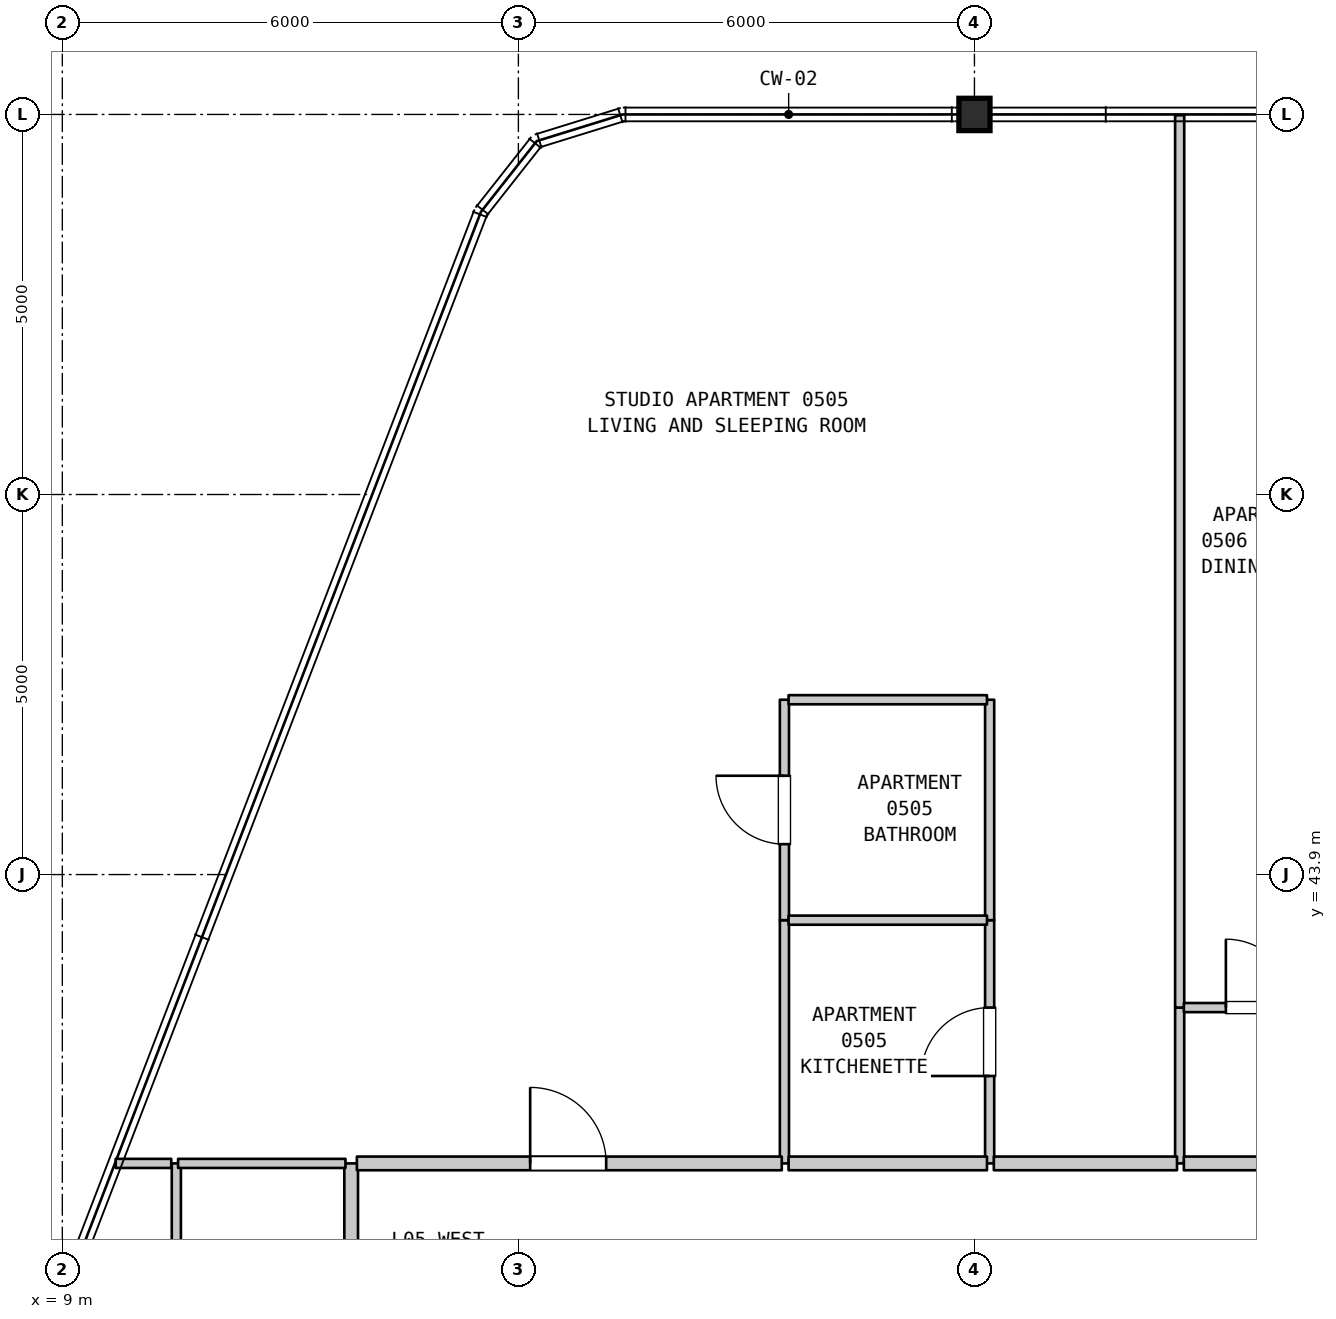
"""IFC4 building model, lengths in metres.
Left out: names, types, materials, properties, quantities, classifications, styles, units other than length and angle.
Written with IfcOpenShell. Run it as: python <this file> out.ifc"""

import sys

from ifc_helpers import new_model, si_unit, direction, frame, frame_2d, origin, origin_2d, place, context, subcontext, project, spatial, rectangle, i_section, extrude, element, fill, save


model = new_model("IFC4")
c1 = context("Model", 3, precision=1e-05, world=origin(), true_north=direction((0.0, 1.0)))
c2 = subcontext(c1, "Body", "Model", "MODEL_VIEW")
j1 = project(units=[si_unit("LENGTHUNIT", "METRE"), si_unit("PLANEANGLEUNIT", "RADIAN")], contexts=[c1])
p1 = place(None, origin())
s1 = spatial("IfcSite", under=j1, at=p1, CompositionType="ELEMENT")
p2 = place(p1, origin())
s2 = spatial("IfcBuilding", under=s1, at=p2, CompositionType="ELEMENT")
p3 = place(p2, frame((0.0, 0.0, 27.7)))
s3 = spatial("IfcBuildingStorey", under=s2, at=p3, CompositionType="ELEMENT", Elevation=27.7)
p4 = place(p3, frame((21.0, 53.9, 0.0), z_axis=(0.0, 0.0, 1.0), x_axis=(1.0, 0.0, 0.0)))
e1 = element("IfcColumn", 1, at=p4, inside=s3, PredefinedType="COLUMN", context=c2, shape_type="SweptSolid", body=[
    extrude(i_section(OverallWidth=0.409, OverallDepth=0.425, WebThickness=0.032, FlangeThickness=0.052, FilletRadius=0.015, at=origin_2d()), origin(), (0.0, 0.0, 1.0), 3.7),
])
p5 = place(p3, frame((10.5, 31.45, 0.0), z_axis=(0.0, 0.0, 1.0), x_axis=(0.0, 1.0, 0.0)))
e2 = element("IfcWall", 2, at=p5, inside=s3, PredefinedType="PARTITIONING", context=c2, shape_type="SweptSolid", body=[
    extrude(rectangle(XDim=8.65, YDim=0.12, at=frame_2d((4.325, 0.0))), origin(), (0.0, 0.0, 1.0), 3.385),
])
p6 = place(p3, frame((12.8, 31.45, 0.0), z_axis=(0.0, 0.0, 1.0), x_axis=(0.0, 1.0, 0.0)))
e3 = element("IfcWall", 3, at=p6, inside=s3, PredefinedType="STANDARD", context=c2, shape_type="SweptSolid", body=[
    extrude(rectangle(XDim=8.65, YDim=0.18, at=frame_2d((4.325, 0.0))), origin(), (0.0, 0.0, 1.0), 3.385),
])
p7 = place(p3, frame((18.5, 40.1, 0.0), z_axis=(0.0, 0.0, 1.0), x_axis=(0.0, 1.0, 0.0)))
e4 = element("IfcWall", 4, at=p7, inside=s3, PredefinedType="PARTITIONING", context=c2, shape_type="SweptSolid", body=[
    extrude(rectangle(XDim=3.2, YDim=0.12, at=frame_2d((1.6, 0.0))), origin(), (0.0, 0.0, 1.0), 3.385),
])
p8 = place(p3, frame((18.5, 43.3, 0.0), z_axis=(0.0, 0.0, 1.0), x_axis=(0.0, 1.0, 0.0)))
e5 = element("IfcWall", 5, at=p8, inside=s3, PredefinedType="PARTITIONING", context=c2, shape_type="SweptSolid", body=[
    extrude(rectangle(XDim=2.9, YDim=0.12, at=frame_2d((1.45, 0.0))), origin(), (0.0, 0.0, 1.0), 3.385),
])
p9 = place(p8, frame((1.0, 0.0, 0.0)))
e6 = element("IfcOpeningElement", 6, at=p9, cuts=e5, PredefinedType="OPENING", context=c2, shape_type="SweptSolid", body=[
    extrude(rectangle(XDim=0.9, YDim=2.1, at=frame_2d((0.45, 1.05))), frame((0.0, 0.07, 0.0), z_axis=(0.0, -1.0, 0.0), x_axis=(1.0, 0.0, 0.0)), (0.0, 0.0, 1.0), 0.14),
])
p10 = place(p3, frame((21.2, 40.1, 0.0), z_axis=(0.0, 0.0, 1.0), x_axis=(0.0, 1.0, 0.0)))
e7 = element("IfcWall", 7, at=p10, inside=s3, PredefinedType="PARTITIONING", context=c2, shape_type="SweptSolid", body=[
    extrude(rectangle(XDim=3.2, YDim=0.12, at=frame_2d((1.6, 0.0))), origin(), (0.0, 0.0, 1.0), 3.385),
])
p11 = place(p10, frame((1.15, 0.0, 0.0)))
e8 = element("IfcOpeningElement", 8, at=p11, cuts=e7, PredefinedType="OPENING", context=c2, shape_type="SweptSolid", body=[
    extrude(rectangle(XDim=0.9, YDim=2.15, at=frame_2d((0.45, 1.075))), frame((0.0, 0.07, 0.0), z_axis=(0.0, -1.0, 0.0), x_axis=(1.0, 0.0, 0.0)), (0.0, 0.0, 1.0), 0.14),
])
p12 = place(p3, frame((21.2, 43.3, 0.0), z_axis=(0.0, 0.0, 1.0), x_axis=(0.0, 1.0, 0.0)))
e9 = element("IfcWall", 9, at=p12, inside=s3, PredefinedType="PARTITIONING", context=c2, shape_type="SweptSolid", body=[
    extrude(rectangle(XDim=2.9, YDim=0.12, at=frame_2d((1.45, 0.0))), origin(), (0.0, 0.0, 1.0), 3.385),
])
p13 = place(p3, frame((23.7, 40.1, 0.0), z_axis=(0.0, 0.0, 1.0), x_axis=(0.0, 1.0, 0.0)))
e10 = element("IfcWall", 10, at=p13, inside=s3, PredefinedType="PARTITIONING", context=c2, shape_type="SweptSolid", body=[
    extrude(rectangle(XDim=2.05, YDim=0.12, at=frame_2d((1.025, 0.0))), origin(), (0.0, 0.0, 1.0), 3.385),
])
p14 = place(p3, frame((23.7, 42.15, 0.0), z_axis=(0.0, 0.0, 1.0), x_axis=(0.0, 1.0, 0.0)))
e11 = element("IfcWall", 11, at=p14, inside=s3, PredefinedType="PARTITIONING", context=c2, shape_type="SweptSolid", body=[
    extrude(rectangle(XDim=11.74, YDim=0.12, at=frame_2d((5.87, 0.0))), origin(), (0.0, 0.0, 1.0), 3.385),
])
p15 = place(p3, frame((9.702, 40.1, 0.0), z_axis=(0.0, 0.0, 1.0), x_axis=(1.0, 0.0, 0.0)))
e12 = element("IfcWall", 12, at=p15, inside=s3, PredefinedType="PARTITIONING", context=c2, shape_type="SweptSolid", body=[
    extrude(rectangle(XDim=0.731, YDim=0.12, at=frame_2d((0.366, 0.0))), origin(), (0.0, 0.0, 1.0), 3.385),
])
p16 = place(p3, frame((10.523, 40.1, 0.0), z_axis=(0.0, 0.0, 1.0), x_axis=(1.0, 0.0, 0.0)))
e13 = element("IfcWall", 13, at=p16, inside=s3, PredefinedType="PARTITIONING", context=c2, shape_type="SweptSolid", body=[
    extrude(rectangle(XDim=2.202, YDim=0.12, at=frame_2d((1.101, 0.0))), origin(), (0.0, 0.0, 1.0), 3.385),
])
p17 = place(p3, frame((12.875, 40.1, 0.0), z_axis=(0.0, 0.0, 1.0), x_axis=(1.0, 0.0, 0.0)))
e14 = element("IfcWall", 14, at=p17, inside=s3, PredefinedType="STANDARD", context=c2, shape_type="SweptSolid", body=[
    extrude(rectangle(XDim=5.59, YDim=0.18, at=frame_2d((2.795, 0.0))), origin(), (0.0, 0.0, 1.0), 3.385),
])
p18 = place(p17, frame((2.28, 0.0, 0.0)))
e15 = element("IfcOpeningElement", 15, at=p18, cuts=e14, PredefinedType="OPENING", context=c2, shape_type="SweptSolid", body=[
    extrude(rectangle(XDim=1.0, YDim=2.15, at=frame_2d((0.5, 1.075))), frame((0.0, 0.1, 0.0), z_axis=(0.0, -1.0, 0.0), x_axis=(1.0, 0.0, 0.0)), (0.0, 0.0, 1.0), 0.2),
])
p19 = place(p3, frame((18.555, 40.1, 0.0), z_axis=(0.0, 0.0, 1.0), x_axis=(1.0, 0.0, 0.0)))
e16 = element("IfcWall", 16, at=p19, inside=s3, PredefinedType="STANDARD", context=c2, shape_type="SweptSolid", body=[
    extrude(rectangle(XDim=2.61, YDim=0.18, at=frame_2d((1.305, 0.0))), origin(), (0.0, 0.0, 1.0), 3.385),
])
p20 = place(p3, frame((21.255, 40.1, 0.0), z_axis=(0.0, 0.0, 1.0), x_axis=(1.0, 0.0, 0.0)))
e17 = element("IfcWall", 17, at=p20, inside=s3, PredefinedType="STANDARD", context=c2, shape_type="SweptSolid", body=[
    extrude(rectangle(XDim=2.41, YDim=0.18, at=frame_2d((1.205, 0.0))), origin(), (0.0, 0.0, 1.0), 3.385),
])
p21 = place(p3, frame((23.755, 40.1, 0.0), z_axis=(0.0, 0.0, 1.0), x_axis=(1.0, 0.0, 0.0)))
e18 = element("IfcWall", 18, at=p21, inside=s3, PredefinedType="STANDARD", context=c2, shape_type="SweptSolid", body=[
    extrude(rectangle(XDim=5.095, YDim=0.18, at=frame_2d((2.548, 0.0))), origin(), (0.0, 0.0, 1.0), 3.385),
])
p22 = place(p21, frame((2.08, 0.0, 0.0)))
e19 = element("IfcOpeningElement", 19, at=p22, cuts=e18, PredefinedType="OPENING", context=c2, shape_type="SweptSolid", body=[
    extrude(rectangle(XDim=1.0, YDim=2.15, at=frame_2d((0.5, 1.075))), frame((0.0, 0.1, 0.0), z_axis=(0.0, -1.0, 0.0), x_axis=(1.0, 0.0, 0.0)), (0.0, 0.0, 1.0), 0.2),
])
p23 = place(p3, frame((23.755, 42.15, 0.0), z_axis=(0.0, 0.0, 1.0), x_axis=(1.0, 0.0, 0.0)))
e20 = element("IfcWall", 20, at=p23, inside=s3, PredefinedType="PARTITIONING", context=c2, shape_type="SweptSolid", body=[
    extrude(rectangle(XDim=2.16, YDim=0.12, at=frame_2d((1.08, 0.0))), origin(), (0.0, 0.0, 1.0), 3.385),
])
p24 = place(p23, frame((0.553, 0.0, 0.0)))
e21 = element("IfcOpeningElement", 21, at=p24, cuts=e20, PredefinedType="OPENING", context=c2, shape_type="SweptSolid", body=[
    extrude(rectangle(XDim=0.9, YDim=2.15, at=frame_2d((0.45, 1.075))), frame((0.0, 0.07, 0.0), z_axis=(0.0, -1.0, 0.0), x_axis=(1.0, 0.0, 0.0)), (0.0, 0.0, 1.0), 0.14),
])
for number, where, z_axis, x_axis in (
    (22, (18.555, 43.3, 0.0), (0.0, 0.0, 1.0), (1.0, 0.0, 0.0)),
    (23, (18.555, 46.2, 0.0), (0.0, 0.0, 1.0), (1.0, 0.0, 0.0)),
):
    element("IfcWall", number, at=place(p3, frame(where, z_axis=z_axis, x_axis=x_axis)), inside=s3, PredefinedType="PARTITIONING", context=c2, shape_type="SweptSolid", body=[
        extrude(rectangle(XDim=2.61, YDim=0.12, at=frame_2d((1.305, 0.0))), origin(), (0.0, 0.0, 1.0), 3.385),
    ])
p25 = place(p9, origin())
e24 = element("IfcDoor", 24, at=p25, inside=s3, OperationType="SINGLE_SWING_RIGHT", PredefinedType="DOOR", context=c2, shape_type="SweptSolid", body=[
    extrude(rectangle(XDim=0.9, YDim=2.1, at=frame_2d((0.45, 1.05))), frame((0.0, 0.025, 0.0), z_axis=(0.0, -1.0, 0.0), x_axis=(1.0, 0.0, 0.0)), (0.0, 0.0, 1.0), 0.05),
])
fill(e6, e24)
p26 = place(p11, origin())
e25 = element("IfcDoor", 25, at=p26, inside=s3, OperationType="SINGLE_SWING_LEFT", PredefinedType="DOOR", context=c2, shape_type="SweptSolid", body=[
    extrude(rectangle(XDim=0.9, YDim=2.15, at=frame_2d((0.45, 1.075))), frame((0.0, 0.025, 0.0), z_axis=(0.0, -1.0, 0.0), x_axis=(1.0, 0.0, 0.0)), (0.0, 0.0, 1.0), 0.05),
])
fill(e8, e25)
p27 = place(p18, origin())
e26 = element("IfcDoor", 26, at=p27, inside=s3, OperationType="SINGLE_SWING_LEFT", PredefinedType="DOOR", context=c2, shape_type="SweptSolid", body=[
    extrude(rectangle(XDim=1.0, YDim=2.15, at=frame_2d((0.5, 1.075))), frame((0.0, 0.025, 0.0), z_axis=(0.0, -1.0, 0.0), x_axis=(1.0, 0.0, 0.0)), (0.0, 0.0, 1.0), 0.05),
])
fill(e15, e26)
p28 = place(p24, origin())
e27 = element("IfcDoor", 27, at=p28, inside=s3, OperationType="SINGLE_SWING_LEFT", PredefinedType="DOOR", context=c2, shape_type="SweptSolid", body=[
    extrude(rectangle(XDim=0.9, YDim=2.15, at=frame_2d((0.45, 1.075))), frame((0.0, 0.025, 0.0), z_axis=(0.0, -1.0, 0.0), x_axis=(1.0, 0.0, 0.0)), (0.0, 0.0, 1.0), 0.05),
])
fill(e21, e27)
save(model, sys.argv[1])
